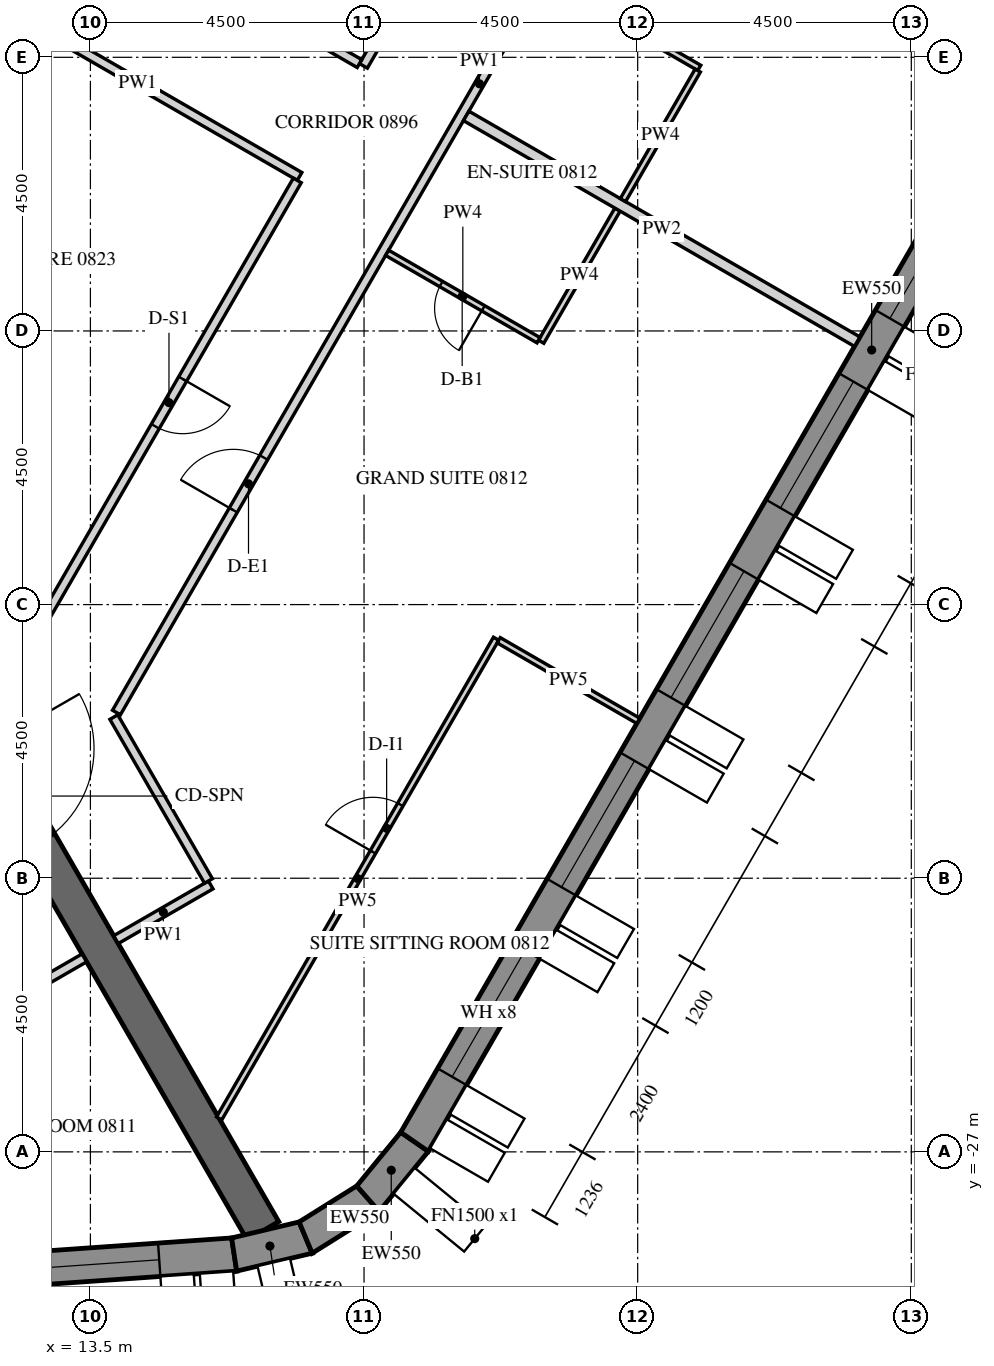
"""IFC4 building model, lengths in metres.
Left out: names, types, materials, properties, quantities, classifications, styles, units other than length and angle.
Written with IfcOpenShell. Run it as: python <this file> out.ifc"""

import sys

from ifc_helpers import new_model, si_unit, direction, frame, frame_2d, origin, place, context, subcontext, project, spatial, polyline, rectangle, outline, extrude, element, fill, save


model = new_model("IFC4")
c1 = context("Model", 3, precision=1e-05, world=origin(), true_north=direction((0.0, 1.0)))
c2 = subcontext(c1, "Body", "Model", "MODEL_VIEW")
j1 = project(units=[si_unit("LENGTHUNIT", "METRE"), si_unit("PLANEANGLEUNIT", "RADIAN")], contexts=[c1])
p1 = place(None, origin())
s1 = spatial("IfcSite", under=j1, at=p1, CompositionType="ELEMENT")
p2 = place(p1, origin())
s2 = spatial("IfcBuilding", under=s1, at=p2, CompositionType="ELEMENT")
p3 = place(p2, frame((0.0, 0.0, 111.6)))
s3 = spatial("IfcBuildingStorey", under=s2, at=p3, CompositionType="ELEMENT", Elevation=111.6)
p4 = place(p3, frame((-14.134, -30.786, -0.15), z_axis=(0.0, 0.0, 1.0), x_axis=(0.997564037441, 0.069756657061, 0.0)))
e1 = element("IfcWall", 1, at=p4, inside=s3, PredefinedType="SOLIDWALL", context=c2, shape_type="SweptSolid", body=[
    extrude(outline(polyline([(-0.026, -0.275), (30.094, -0.275), (30.049, 0.275), (0.026, 0.275), (-0.026, -0.275)])), origin(), (0.0, 0.0, 1.0), 3.9),
])
p5 = place(p4, frame((1.236, 0.0, 1.05)))
e2 = element("IfcOpeningElement", 2, at=p5, cuts=e1, PredefinedType="OPENING", context=c2, shape_type="SweptSolid", body=[
    extrude(rectangle(XDim=2.4, YDim=2.4, at=frame_2d((1.2, 1.2))), frame((0.0, 0.285, 0.0), z_axis=(0.0, -1.0, 0.0), x_axis=(1.0, 0.0, 0.0)), (0.0, 0.0, 1.0), 0.57),
])
p6 = place(p4, frame((4.835, 0.0, 1.05)))
e3 = element("IfcOpeningElement", 3, at=p6, cuts=e1, PredefinedType="OPENING", context=c2, shape_type="SweptSolid", body=[
    extrude(rectangle(XDim=2.4, YDim=2.4, at=frame_2d((1.2, 1.2))), frame((0.0, 0.285, 0.0), z_axis=(0.0, -1.0, 0.0), x_axis=(1.0, 0.0, 0.0)), (0.0, 0.0, 1.0), 0.57),
])
p7 = place(p4, frame((8.436, 0.0, 1.05)))
e4 = element("IfcOpeningElement", 4, at=p7, cuts=e1, PredefinedType="OPENING", context=c2, shape_type="SweptSolid", body=[
    extrude(rectangle(XDim=2.4, YDim=2.4, at=frame_2d((1.2, 1.2))), frame((0.0, 0.285, 0.0), z_axis=(0.0, -1.0, 0.0), x_axis=(1.0, 0.0, 0.0)), (0.0, 0.0, 1.0), 0.57),
])
p8 = place(p4, frame((12.035, 0.0, 1.05)))
e5 = element("IfcOpeningElement", 5, at=p8, cuts=e1, PredefinedType="OPENING", context=c2, shape_type="SweptSolid", body=[
    extrude(rectangle(XDim=2.4, YDim=2.4, at=frame_2d((1.2, 1.2))), frame((0.0, 0.285, 0.0), z_axis=(0.0, -1.0, 0.0), x_axis=(1.0, 0.0, 0.0)), (0.0, 0.0, 1.0), 0.57),
])
p9 = place(p4, frame((15.635, 0.0, 1.05)))
e6 = element("IfcOpeningElement", 6, at=p9, cuts=e1, PredefinedType="OPENING", context=c2, shape_type="SweptSolid", body=[
    extrude(rectangle(XDim=2.4, YDim=2.4, at=frame_2d((1.2, 1.2))), frame((0.0, 0.285, 0.0), z_axis=(0.0, -1.0, 0.0), x_axis=(1.0, 0.0, 0.0)), (0.0, 0.0, 1.0), 0.57),
])
p10 = place(p4, frame((19.236, 0.0, 1.05)))
e7 = element("IfcOpeningElement", 7, at=p10, cuts=e1, PredefinedType="OPENING", context=c2, shape_type="SweptSolid", body=[
    extrude(rectangle(XDim=2.4, YDim=2.4, at=frame_2d((1.2, 1.2))), frame((0.0, 0.285, 0.0), z_axis=(0.0, -1.0, 0.0), x_axis=(1.0, 0.0, 0.0)), (0.0, 0.0, 1.0), 0.57),
])
p11 = place(p4, frame((22.835, 0.0, 1.05)))
e8 = element("IfcOpeningElement", 8, at=p11, cuts=e1, PredefinedType="OPENING", context=c2, shape_type="SweptSolid", body=[
    extrude(rectangle(XDim=2.4, YDim=2.4, at=frame_2d((1.2, 1.2))), frame((0.0, 0.285, 0.0), z_axis=(0.0, -1.0, 0.0), x_axis=(1.0, 0.0, 0.0)), (0.0, 0.0, 1.0), 0.57),
])
p12 = place(p4, frame((26.436, 0.0, 1.05)))
e9 = element("IfcOpeningElement", 9, at=p12, cuts=e1, PredefinedType="OPENING", context=c2, shape_type="SweptSolid", body=[
    extrude(rectangle(XDim=2.4, YDim=2.4, at=frame_2d((1.2, 1.2))), frame((0.0, 0.285, 0.0), z_axis=(0.0, -1.0, 0.0), x_axis=(1.0, 0.0, 0.0)), (0.0, 0.0, 1.0), 0.57),
])
p13 = place(p3, frame((15.864, -28.688, -0.15), z_axis=(0.0, 0.0, 1.0), x_axis=(0.973063591128, 0.230536868247, 0.0)))
e10 = element("IfcWall", 10, at=p13, inside=s3, PredefinedType="SOLIDWALL", context=c2, shape_type="SweptSolid", body=[
    extrude(outline(polyline([(-0.022, -0.275), (1.253, -0.275), (1.163, 0.275), (0.022, 0.275), (-0.022, -0.275)])), origin(), (0.0, 0.0, 1.0), 3.9),
])
p14 = place(p3, frame((17.04, -28.41, -0.15), z_axis=(0.0, 0.0, 1.0), x_axis=(0.847952888306, 0.530071598195, 0.0)))
e11 = element("IfcWall", 11, at=p14, inside=s3, PredefinedType="SOLIDWALL", context=c2, shape_type="SweptSolid", body=[
    extrude(outline(polyline([(-0.045, -0.275), (1.253, -0.275), (1.163, 0.275), (0.045, 0.275), (-0.045, -0.275)])), origin(), (0.0, 0.0, 1.0), 3.9),
])
p15 = place(p3, frame((18.064, -27.769, -0.15), z_axis=(0.0, 0.0, 1.0), x_axis=(0.633842757806, 0.773461930787, 0.0)))
e12 = element("IfcWall", 12, at=p15, inside=s3, PredefinedType="SOLIDWALL", context=c2, shape_type="SweptSolid", body=[
    extrude(outline(polyline([(-0.045, -0.275), (1.231, -0.275), (1.186, 0.275), (0.045, 0.275), (-0.045, -0.275)])), origin(), (0.0, 0.0, 1.0), 3.9),
])
p16 = place(p3, frame((18.83, -26.835, -0.15), z_axis=(0.0, 0.0, 1.0), x_axis=(0.500003800416, 0.866023209602, 0.0)))
e13 = element("IfcWall", 13, at=p16, inside=s3, PredefinedType="SOLIDWALL", context=c2, shape_type="SweptSolid", body=[
    extrude(outline(polyline([(-0.022, -0.275), (30.097, -0.275), (30.045, 0.275), (0.022, 0.275), (-0.022, -0.275)])), origin(), (0.0, 0.0, 1.0), 3.9),
])
p17 = place(p16, frame((1.236, 0.0, 1.05)))
e14 = element("IfcOpeningElement", 14, at=p17, cuts=e13, PredefinedType="OPENING", context=c2, shape_type="SweptSolid", body=[
    extrude(rectangle(XDim=2.4, YDim=2.4, at=frame_2d((1.2, 1.2))), frame((0.0, 0.285, 0.0), z_axis=(0.0, -1.0, 0.0), x_axis=(1.0, 0.0, 0.0)), (0.0, 0.0, 1.0), 0.57),
])
p18 = place(p16, frame((4.835, 0.0, 1.05)))
e15 = element("IfcOpeningElement", 15, at=p18, cuts=e13, PredefinedType="OPENING", context=c2, shape_type="SweptSolid", body=[
    extrude(rectangle(XDim=2.4, YDim=2.4, at=frame_2d((1.2, 1.2))), frame((0.0, 0.285, 0.0), z_axis=(0.0, -1.0, 0.0), x_axis=(1.0, 0.0, 0.0)), (0.0, 0.0, 1.0), 0.57),
])
p19 = place(p16, frame((8.436, 0.0, 1.05)))
e16 = element("IfcOpeningElement", 16, at=p19, cuts=e13, PredefinedType="OPENING", context=c2, shape_type="SweptSolid", body=[
    extrude(rectangle(XDim=2.4, YDim=2.4, at=frame_2d((1.2, 1.2))), frame((0.0, 0.285, 0.0), z_axis=(0.0, -1.0, 0.0), x_axis=(1.0, 0.0, 0.0)), (0.0, 0.0, 1.0), 0.57),
])
p20 = place(p16, frame((12.035, 0.0, 1.05)))
e17 = element("IfcOpeningElement", 17, at=p20, cuts=e13, PredefinedType="OPENING", context=c2, shape_type="SweptSolid", body=[
    extrude(rectangle(XDim=2.4, YDim=2.4, at=frame_2d((1.2, 1.2))), frame((0.0, 0.285, 0.0), z_axis=(0.0, -1.0, 0.0), x_axis=(1.0, 0.0, 0.0)), (0.0, 0.0, 1.0), 0.57),
])
p21 = place(p16, frame((15.635, 0.0, 1.05)))
e18 = element("IfcOpeningElement", 18, at=p21, cuts=e13, PredefinedType="OPENING", context=c2, shape_type="SweptSolid", body=[
    extrude(rectangle(XDim=2.4, YDim=2.4, at=frame_2d((1.2, 1.2))), frame((0.0, 0.285, 0.0), z_axis=(0.0, -1.0, 0.0), x_axis=(1.0, 0.0, 0.0)), (0.0, 0.0, 1.0), 0.57),
])
p22 = place(p16, frame((19.236, 0.0, 1.05)))
e19 = element("IfcOpeningElement", 19, at=p22, cuts=e13, PredefinedType="OPENING", context=c2, shape_type="SweptSolid", body=[
    extrude(rectangle(XDim=2.4, YDim=2.4, at=frame_2d((1.2, 1.2))), frame((0.0, 0.285, 0.0), z_axis=(0.0, -1.0, 0.0), x_axis=(1.0, 0.0, 0.0)), (0.0, 0.0, 1.0), 0.57),
])
p23 = place(p16, frame((22.835, 0.0, 1.05)))
e20 = element("IfcOpeningElement", 20, at=p23, cuts=e13, PredefinedType="OPENING", context=c2, shape_type="SweptSolid", body=[
    extrude(rectangle(XDim=2.4, YDim=2.4, at=frame_2d((1.2, 1.2))), frame((0.0, 0.285, 0.0), z_axis=(0.0, -1.0, 0.0), x_axis=(1.0, 0.0, 0.0)), (0.0, 0.0, 1.0), 0.57),
])
p24 = place(p16, frame((26.436, 0.0, 1.05)))
e21 = element("IfcOpeningElement", 21, at=p24, cuts=e13, PredefinedType="OPENING", context=c2, shape_type="SweptSolid", body=[
    extrude(rectangle(XDim=2.4, YDim=2.4, at=frame_2d((1.2, 1.2))), frame((0.0, 0.285, 0.0), z_axis=(0.0, -1.0, 0.0), x_axis=(1.0, 0.0, 0.0)), (0.0, 0.0, 1.0), 0.57),
])
p25 = place(p3, frame((7.91, -13.7, -0.15), z_axis=(0.0, 0.0, 1.0), x_axis=(0.499999880136, 0.866025472988, 0.0)))
e22 = element("IfcWall", 22, at=p25, inside=s3, PredefinedType="SHEAR", context=c2, shape_type="SweptSolid", body=[
    extrude(outline(polyline([(-0.173, -0.3), (15.993, -0.3), (15.646, 0.3), (0.173, 0.3), (-0.173, -0.3)])), origin(), (0.0, 0.0, 1.0), 3.9),
])
p26 = place(p25, frame((7.039, 0.0, 0.15)))
e23 = element("IfcOpeningElement", 23, at=p26, cuts=e22, PredefinedType="OPENING", context=c2, shape_type="SweptSolid", body=[
    extrude(rectangle(XDim=1.8, YDim=2.4, at=frame_2d((0.9, 1.2))), frame((0.0, 0.31, 0.0), z_axis=(0.0, -1.0, 0.0), x_axis=(1.0, 0.0, 0.0)), (0.0, 0.0, 1.0), 0.62),
])
p27 = place(p3, frame((8.083, -14.0, -0.15), z_axis=(0.0, 0.0, 1.0), x_axis=(0.499997680643, -0.866026742862, 0.0)))
e24 = element("IfcWall", 24, at=p27, inside=s3, PredefinedType="SHEAR", context=c2, shape_type="SweptSolid", body=[
    extrude(rectangle(XDim=16.509, YDim=0.6, at=frame_2d((8.254, 0.0))), origin(), (0.0, 0.0, 1.0), 3.9),
])
p28 = place(p27, frame((7.354, 0.0, 0.15)))
e25 = element("IfcOpeningElement", 25, at=p28, cuts=e24, PredefinedType="OPENING", context=c2, shape_type="SweptSolid", body=[
    extrude(rectangle(XDim=1.8, YDim=2.4, at=frame_2d((0.9, 1.2))), frame((0.0, 0.31, 0.0), z_axis=(0.0, -1.0, 0.0), x_axis=(1.0, 0.0, 0.0)), (0.0, 0.0, 1.0), 0.62),
])
p29 = place(p3, frame((11.906, -24.673, 0.0), z_axis=(0.0, 0.0, 1.0), x_axis=(0.866013532718, 0.500020560727, 0.0)))
e26 = element("IfcWall", 26, at=p29, inside=s3, PredefinedType="PARTITIONING", context=c2, shape_type="SweptSolid", body=[
    extrude(rectangle(XDim=1.725, YDim=0.15, at=frame_2d((0.863, 0.0))), origin(), (0.0, 0.0, 1.0), 2.988),
])
p30 = place(p3, frame((13.92, -23.51, 0.0), z_axis=(0.0, 0.0, 1.0), x_axis=(0.866047807691, 0.499961193289, 0.0)))
e27 = element("IfcWall", 27, at=p30, inside=s3, PredefinedType="PARTITIONING", context=c2, shape_type="SweptSolid", body=[
    extrude(rectangle(XDim=1.8, YDim=0.15, at=frame_2d((0.9, 0.0))), origin(), (0.0, 0.0, 1.0), 2.988),
])
p31 = place(p3, frame((15.441, -22.545, 0.0), z_axis=(0.0, 0.0, 1.0), x_axis=(-0.500037089193, 0.86600398927, 0.0)))
e28 = element("IfcWall", 28, at=p31, inside=s3, PredefinedType="PARTITIONING", context=c2, shape_type="SweptSolid", body=[
    extrude(rectangle(XDim=3.112, YDim=0.15, at=frame_2d((1.556, 0.0))), origin(), (0.0, 0.0, 1.0), 2.988),
])
p32 = place(p3, frame((13.928, -19.775, 0.0), z_axis=(0.0, 0.0, 1.0), x_axis=(0.50000450071, 0.866022805283, 0.0)))
e29 = element("IfcWall", 29, at=p32, inside=s3, PredefinedType="PARTITIONING", context=c2, shape_type="SweptSolid", body=[
    extrude(rectangle(XDim=23.877, YDim=0.15, at=frame_2d((11.938, 0.0))), origin(), (0.0, 0.0, 1.0), 2.988),
])
p33 = place(p32, frame((3.843, 0.0, 0.0)))
e30 = element("IfcOpeningElement", 30, at=p33, cuts=e29, PredefinedType="OPENING", context=c2, shape_type="SweptSolid", body=[
    extrude(rectangle(XDim=1.0, YDim=2.1, at=frame_2d((0.5, 1.05))), frame((0.0, 0.085, 0.0), z_axis=(0.0, -1.0, 0.0), x_axis=(1.0, 0.0, 0.0)), (0.0, 0.0, 1.0), 0.17),
])
p34 = place(p32, frame((18.425, 0.0, 0.0)))
e31 = element("IfcOpeningElement", 31, at=p34, cuts=e29, PredefinedType="OPENING", context=c2, shape_type="SweptSolid", body=[
    extrude(rectangle(XDim=1.0, YDim=2.1, at=frame_2d((0.5, 1.05))), frame((0.0, 0.085, 0.0), z_axis=(0.0, -1.0, 0.0), x_axis=(1.0, 0.0, 0.0)), (0.0, 0.0, 1.0), 0.17),
])
p35 = place(p3, frame((23.704, 0.757, 0.0), z_axis=(0.0, 0.0, 1.0), x_axis=(-0.500010297365, -0.866019458516, 0.0)))
e32 = element("IfcWall", 32, at=p35, inside=s3, PredefinedType="PARTITIONING", context=c2, shape_type="SweptSolid", body=[
    extrude(rectangle(XDim=11.429, YDim=0.15, at=frame_2d((5.714, 0.0))), origin(), (0.0, 0.0, 1.0), 2.988),
])
p36 = place(p35, frame((5.264, 0.0, 0.0)))
e33 = element("IfcOpeningElement", 33, at=p36, cuts=e32, PredefinedType="OPENING", context=c2, shape_type="SweptSolid", body=[
    extrude(rectangle(XDim=0.9, YDim=2.1, at=frame_2d((0.45, 1.05))), frame((0.0, 0.085, 0.0), z_axis=(0.0, -1.0, 0.0), x_axis=(1.0, 0.0, 0.0)), (0.0, 0.0, 1.0), 0.17),
])
p37 = place(p3, frame((17.925, -9.103, 0.0), z_axis=(0.0, 0.0, 1.0), x_axis=(-0.866013586754, 0.500020467139, 0.0)))
e34 = element("IfcWall", 34, at=p37, inside=s3, PredefinedType="PARTITIONING", context=c2, shape_type="SweptSolid", body=[
    extrude(rectangle(XDim=6.075, YDim=0.15, at=frame_2d((3.038, 0.0))), origin(), (0.0, 0.0, 1.0), 2.988),
])
p38 = place(p3, frame((11.614, -7.884, 0.0), z_axis=(0.0, 0.0, 1.0), x_axis=(0.866033542371, -0.499985903289, 0.0)))
e35 = element("IfcWall", 35, at=p38, inside=s3, PredefinedType="PARTITIONING", context=c2, shape_type="SweptSolid", body=[
    extrude(rectangle(XDim=6.15, YDim=0.15, at=frame_2d((3.075, 0.0))), origin(), (0.0, 0.0, 1.0), 2.988),
])
p39 = place(p3, frame((16.902, -11.024, 0.0), z_axis=(0.0, 0.0, 1.0), x_axis=(-0.499999527968, -0.866025676312, 0.0)))
e36 = element("IfcWall", 36, at=p39, inside=s3, PredefinedType="PARTITIONING", context=c2, shape_type="SweptSolid", body=[
    extrude(rectangle(XDim=8.441, YDim=0.15, at=frame_2d((4.22, 0.0))), origin(), (0.0, 0.0, 1.0), 2.988),
])
p40 = place(p39, frame((3.771, 0.0, 0.0)))
e37 = element("IfcOpeningElement", 37, at=p40, cuts=e36, PredefinedType="OPENING", context=c2, shape_type="SweptSolid", body=[
    extrude(rectangle(XDim=0.9, YDim=2.1, at=frame_2d((0.45, 1.05))), frame((0.0, 0.085, 0.0), z_axis=(0.0, -1.0, 0.0), x_axis=(1.0, 0.0, 0.0)), (0.0, 0.0, 1.0), 0.17),
])
p41 = place(p3, frame((22.168, -11.504, 0.0), z_axis=(0.0, 0.0, 1.0), x_axis=(-0.50001992892, -0.866013897511, 0.0)))
e38 = element("IfcWall", 38, at=p41, inside=s3, PredefinedType="PARTITIONING", context=c2, shape_type="SweptSolid", body=[
    extrude(rectangle(XDim=2.51, YDim=0.1, at=frame_2d((1.255, 0.0))), origin(), (0.0, 0.0, 1.0), 2.988),
])
p42 = place(p3, frame((20.87, -13.653, 0.0), z_axis=(0.0, 0.0, 1.0), x_axis=(-0.866039941686, 0.499974818771, 0.0)))
e39 = element("IfcWall", 39, at=p42, inside=s3, PredefinedType="PARTITIONING", context=c2, shape_type="SweptSolid", body=[
    extrude(rectangle(XDim=2.875, YDim=0.1, at=frame_2d((1.438, 0.0))), origin(), (0.0, 0.0, 1.0), 2.988),
])
p43 = place(p42, frame((1.05, 0.0, 0.0)))
e40 = element("IfcOpeningElement", 40, at=p43, cuts=e39, PredefinedType="OPENING", context=c2, shape_type="SweptSolid", body=[
    extrude(rectangle(XDim=0.8, YDim=2.1, at=frame_2d((0.4, 1.05))), frame((0.0, 0.06, 0.0), z_axis=(0.0, -1.0, 0.0), x_axis=(1.0, 0.0, 0.0)), (0.0, 0.0, 1.0), 0.12),
])
p44 = place(p3, frame((15.617, -26.45, 0.0), z_axis=(0.0, 0.0, 1.0), x_axis=(0.499984630745, 0.866034277046, 0.0)))
e41 = element("IfcWall", 41, at=p44, inside=s3, PredefinedType="PARTITIONING", context=c2, shape_type="SweptSolid", body=[
    extrude(rectangle(XDim=9.109, YDim=0.1, at=frame_2d((4.554, 0.0))), origin(), (0.0, 0.0, 1.0), 2.988),
])
p45 = place(p44, frame((5.059, 0.0, 0.0)))
e42 = element("IfcOpeningElement", 42, at=p45, cuts=e41, PredefinedType="OPENING", context=c2, shape_type="SweptSolid", body=[
    extrude(rectangle(XDim=0.9, YDim=2.1, at=frame_2d((0.45, 1.05))), frame((0.0, 0.06, 0.0), z_axis=(0.0, -1.0, 0.0), x_axis=(1.0, 0.0, 0.0)), (0.0, 0.0, 1.0), 0.12),
])
p46 = place(p3, frame((20.215, -18.587, 0.0), z_axis=(0.0, 0.0, 1.0), x_axis=(0.866029095148, -0.499993606316, 0.0)))
e43 = element("IfcWall", 43, at=p46, inside=s3, PredefinedType="PARTITIONING", context=c2, shape_type="SweptSolid", body=[
    extrude(rectangle(XDim=2.65, YDim=0.1, at=frame_2d((1.325, 0.0))), origin(), (0.0, 0.0, 1.0), 2.988),
])
p47 = place(p3, frame((26.11, -13.676, 0.0), z_axis=(0.0, 0.0, 1.0), x_axis=(-0.866014745021, 0.500018461065, 0.0)))
e44 = element("IfcWall", 44, at=p47, inside=s3, PredefinedType="PARTITIONING", context=c2, shape_type="SweptSolid", body=[
    extrude(rectangle(XDim=7.425, YDim=0.18, at=frame_2d((3.712, 0.0))), origin(), (0.0, 0.0, 1.0), 2.988),
])
p48 = place(p3, frame((20.98, -7.712, 0.0), z_axis=(0.0, 0.0, 1.0), x_axis=(0.86601045545, -0.500025890382, 0.0)))
e45 = element("IfcWall", 45, at=p48, inside=s3, PredefinedType="PARTITIONING", context=c2, shape_type="SweptSolid", body=[
    extrude(rectangle(XDim=2.925, YDim=0.1, at=frame_2d((1.462, 0.0))), origin(), (0.0, 0.0, 1.0), 2.988),
])
p49 = place(p48, frame((1.025, 0.0, 0.0)))
e46 = element("IfcOpeningElement", 46, at=p49, cuts=e45, PredefinedType="OPENING", context=c2, shape_type="SweptSolid", body=[
    extrude(rectangle(XDim=0.8, YDim=2.1, at=frame_2d((0.4, 1.05))), frame((0.0, 0.06, 0.0), z_axis=(0.0, -1.0, 0.0), x_axis=(1.0, 0.0, 0.0)), (0.0, 0.0, 1.0), 0.12),
])
p50 = place(p3, frame((23.488, -9.218, 0.0), z_axis=(0.0, 0.0, 1.0), x_axis=(-0.500003092839, -0.866023618125, 0.0)))
e47 = element("IfcWall", 47, at=p50, inside=s3, PredefinedType="PARTITIONING", context=c2, shape_type="SweptSolid", body=[
    extrude(rectangle(XDim=2.46, YDim=0.1, at=frame_2d((1.23, 0.0))), origin(), (0.0, 0.0, 1.0), 2.988),
])
p51 = place(p12, frame((0.0, 0.205, 0.0)))
e48 = element("IfcWindow", 48, at=p51, inside=s3, PartitioningType="DOUBLE_PANEL_VERTICAL", PredefinedType="WINDOW", context=c2, shape_type="SweptSolid", body=[
    extrude(rectangle(XDim=2.4, YDim=2.4, at=frame_2d((1.2, 1.2))), frame((0.0, 0.03, 0.0), z_axis=(0.0, -1.0, 0.0), x_axis=(1.0, 0.0, 0.0)), (0.0, 0.0, 1.0), 0.06),
])
fill(e9, e48)
p52 = place(p17, frame((0.0, 0.205, 0.0)))
e49 = element("IfcWindow", 49, at=p52, inside=s3, PartitioningType="DOUBLE_PANEL_VERTICAL", PredefinedType="WINDOW", context=c2, shape_type="SweptSolid", body=[
    extrude(rectangle(XDim=2.4, YDim=2.4, at=frame_2d((1.2, 1.2))), frame((0.0, 0.03, 0.0), z_axis=(0.0, -1.0, 0.0), x_axis=(1.0, 0.0, 0.0)), (0.0, 0.0, 1.0), 0.06),
])
fill(e14, e49)
p53 = place(p18, frame((0.0, 0.205, 0.0)))
e50 = element("IfcWindow", 50, at=p53, inside=s3, PartitioningType="DOUBLE_PANEL_VERTICAL", PredefinedType="WINDOW", context=c2, shape_type="SweptSolid", body=[
    extrude(rectangle(XDim=2.4, YDim=2.4, at=frame_2d((1.2, 1.2))), frame((0.0, 0.03, 0.0), z_axis=(0.0, -1.0, 0.0), x_axis=(1.0, 0.0, 0.0)), (0.0, 0.0, 1.0), 0.06),
])
fill(e15, e50)
p54 = place(p19, frame((0.0, 0.205, 0.0)))
e51 = element("IfcWindow", 51, at=p54, inside=s3, PartitioningType="DOUBLE_PANEL_VERTICAL", PredefinedType="WINDOW", context=c2, shape_type="SweptSolid", body=[
    extrude(rectangle(XDim=2.4, YDim=2.4, at=frame_2d((1.2, 1.2))), frame((0.0, 0.03, 0.0), z_axis=(0.0, -1.0, 0.0), x_axis=(1.0, 0.0, 0.0)), (0.0, 0.0, 1.0), 0.06),
])
fill(e16, e51)
p55 = place(p20, frame((0.0, 0.205, 0.0)))
e52 = element("IfcWindow", 52, at=p55, inside=s3, PartitioningType="DOUBLE_PANEL_VERTICAL", PredefinedType="WINDOW", context=c2, shape_type="SweptSolid", body=[
    extrude(rectangle(XDim=2.4, YDim=2.4, at=frame_2d((1.2, 1.2))), frame((0.0, 0.03, 0.0), z_axis=(0.0, -1.0, 0.0), x_axis=(1.0, 0.0, 0.0)), (0.0, 0.0, 1.0), 0.06),
])
fill(e17, e52)
p56 = place(p21, frame((0.0, 0.205, 0.0)))
e53 = element("IfcWindow", 53, at=p56, inside=s3, PartitioningType="DOUBLE_PANEL_VERTICAL", PredefinedType="WINDOW", context=c2, shape_type="SweptSolid", body=[
    extrude(rectangle(XDim=2.4, YDim=2.4, at=frame_2d((1.2, 1.2))), frame((0.0, 0.03, 0.0), z_axis=(0.0, -1.0, 0.0), x_axis=(1.0, 0.0, 0.0)), (0.0, 0.0, 1.0), 0.06),
])
fill(e18, e53)
p57 = place(p33, origin())
e54 = element("IfcDoor", 54, at=p57, inside=s3, OperationType="SINGLE_SWING_RIGHT", PredefinedType="DOOR", context=c2, shape_type="SweptSolid", body=[
    extrude(rectangle(XDim=1.0, YDim=2.1, at=frame_2d((0.5, 1.05))), frame((0.0, 0.025, 0.0), z_axis=(0.0, -1.0, 0.0), x_axis=(1.0, 0.0, 0.0)), (0.0, 0.0, 1.0), 0.05),
])
fill(e30, e54)
p58 = place(p43, origin())
e55 = element("IfcDoor", 55, at=p58, inside=s3, OperationType="SINGLE_SWING_RIGHT", PredefinedType="DOOR", context=c2, shape_type="SweptSolid", body=[
    extrude(rectangle(XDim=0.8, YDim=2.1, at=frame_2d((0.4, 1.05))), frame((0.0, 0.025, 0.0), z_axis=(0.0, -1.0, 0.0), x_axis=(1.0, 0.0, 0.0)), (0.0, 0.0, 1.0), 0.05),
])
fill(e40, e55)
p59 = place(p45, origin())
e56 = element("IfcDoor", 56, at=p59, inside=s3, OperationType="SINGLE_SWING_LEFT", PredefinedType="DOOR", context=c2, shape_type="SweptSolid", body=[
    extrude(rectangle(XDim=0.9, YDim=2.1, at=frame_2d((0.45, 1.05))), frame((0.0, 0.025, 0.0), z_axis=(0.0, -1.0, 0.0), x_axis=(1.0, 0.0, 0.0)), (0.0, 0.0, 1.0), 0.05),
])
fill(e42, e56)
p60 = place(p40, origin())
e57 = element("IfcDoor", 57, at=p60, inside=s3, OperationType="SINGLE_SWING_RIGHT", PredefinedType="DOOR", context=c2, shape_type="SweptSolid", body=[
    extrude(rectangle(XDim=0.9, YDim=2.1, at=frame_2d((0.45, 1.05))), frame((0.0, 0.025, 0.0), z_axis=(0.0, -1.0, 0.0), x_axis=(1.0, 0.0, 0.0)), (0.0, 0.0, 1.0), 0.05),
])
fill(e37, e57)
save(model, sys.argv[1])
